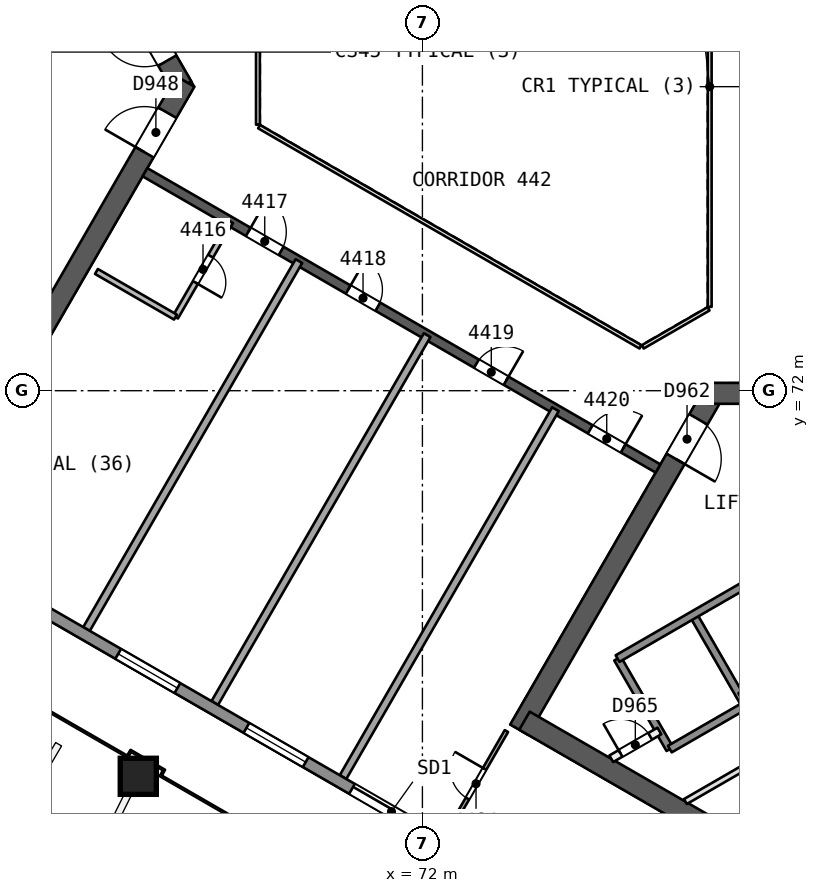
"""IFC4 building model, lengths in metres.
Left out: names, types, materials, properties, quantities, classifications, styles, units other than length and angle.
Written with IfcOpenShell. Run it as: python <this file> out.ifc"""

import sys

from ifc_helpers import new_model, si_unit, direction, frame, frame_2d, origin, origin_2d, place, context, subcontext, project, spatial, rectangle, extrude, element, fill, save


model = new_model("IFC4")
c1 = context("Model", 3, precision=1e-05, world=origin(), true_north=direction((0.0, 1.0)))
c2 = subcontext(c1, "Body", "Model", "MODEL_VIEW")
j1 = project(units=[si_unit("LENGTHUNIT", "METRE"), si_unit("PLANEANGLEUNIT", "RADIAN")], contexts=[c1])
p1 = place(None, origin())
s1 = spatial("IfcSite", under=j1, at=p1, CompositionType="ELEMENT")
p2 = place(p1, origin())
s2 = spatial("IfcBuilding", under=s1, at=p2, CompositionType="ELEMENT")
p3 = place(p2, frame((0.0, 0.0, 182.2)))
s3 = spatial("IfcBuildingStorey", under=s2, at=p3, CompositionType="ELEMENT", Elevation=182.2)
p4 = place(p3, frame((65.682, 80.0, 0.0), z_axis=(0.0, 0.0, 1.0), x_axis=(-0.500000202252, 0.866025287014, 0.0)))
e1 = element("IfcWall", 1, at=p4, inside=s3, PredefinedType="SHEAR", context=c2, shape_type="SweptSolid", body=[
    extrude(rectangle(XDim=10.221, YDim=0.55, at=frame_2d((5.111, 0.0))), origin(), (0.0, 0.0, 1.0), 3.7),
])
p5 = place(p4, frame((0.791, 0.0, 0.0)))
e2 = element("IfcOpeningElement", 2, at=p5, cuts=e1, PredefinedType="OPENING", context=c2, shape_type="SweptSolid", body=[
    extrude(rectangle(XDim=1.2, YDim=2.1, at=frame_2d((0.6, 1.05))), frame((0.0, 0.286, 0.0), z_axis=(0.0, -1.0, 0.0), x_axis=(1.0, 0.0, 0.0)), (0.0, 0.0, 1.0), 0.571),
])
p6 = place(p3, frame((60.709, 71.386, 0.0), z_axis=(0.0, 0.0, 1.0), x_axis=(0.500015938302, 0.866016201606, 0.0)))
e3 = element("IfcWall", 3, at=p6, inside=s3, PredefinedType="SHEAR", context=c2, shape_type="SweptSolid", body=[
    extrude(rectangle(XDim=10.105, YDim=0.55, at=frame_2d((5.053, 0.0))), origin(), (0.0, 0.0, 1.0), 3.7),
])
p7 = place(p6, frame((7.955, 0.0, 0.0)))
e4 = element("IfcOpeningElement", 4, at=p7, cuts=e3, PredefinedType="OPENING", context=c2, shape_type="SweptSolid", body=[
    extrude(rectangle(XDim=1.2, YDim=2.1, at=frame_2d((0.6, 1.05))), frame((0.0, 0.286, 0.0), z_axis=(0.0, -1.0, 0.0), x_axis=(1.0, 0.0, 0.0)), (0.0, 0.0, 1.0), 0.571),
])
p8 = place(p3, frame((79.659, 71.931, 0.0), z_axis=(0.0, 0.0, 1.0), x_axis=(-0.500000202252, -0.866025287014, 0.0)))
e5 = element("IfcWall", 5, at=p8, inside=s3, PredefinedType="SHEAR", context=c2, shape_type="SweptSolid", body=[
    extrude(rectangle(XDim=10.221, YDim=0.55, at=frame_2d((5.111, 0.0))), origin(), (0.0, 0.0, 1.0), 3.7),
])
p9 = place(p8, frame((0.791, 0.0, 0.0)))
e6 = element("IfcOpeningElement", 6, at=p9, cuts=e5, PredefinedType="OPENING", context=c2, shape_type="SweptSolid", body=[
    extrude(rectangle(XDim=1.2, YDim=2.1, at=frame_2d((0.6, 1.05))), frame((0.0, 0.286, 0.0), z_axis=(0.0, -1.0, 0.0), x_axis=(1.0, 0.0, 0.0)), (0.0, 0.0, 1.0), 0.571),
])
p10 = place(p3, frame((74.686, 63.317, 0.0), z_axis=(0.0, 0.0, 1.0), x_axis=(0.866024505738, -0.500001555459, 0.0)))
e7 = element("IfcWall", 7, at=p10, inside=s3, PredefinedType="SHEAR", context=c2, shape_type="SweptSolid", body=[
    extrude(rectangle(XDim=14.059, YDim=0.55, at=frame_2d((7.029, 0.0))), origin(), (0.0, 0.0, 1.0), 3.7),
])
p11 = place(p3, frame((89.605, 71.931, 0.0), z_axis=(0.0, 0.0, 1.0), x_axis=(-1.0, 0.0, 0.0)))
e8 = element("IfcWall", 8, at=p11, inside=s3, PredefinedType="SHEAR", context=c2, shape_type="SweptSolid", body=[
    extrude(rectangle(XDim=10.105, YDim=0.55, at=frame_2d((5.052, 0.0))), origin(), (0.0, 0.0, 1.0), 3.7),
])
p12 = place(p11, frame((7.955, 0.0, 0.0)))
e9 = element("IfcOpeningElement", 9, at=p12, cuts=e8, PredefinedType="OPENING", context=c2, shape_type="SweptSolid", body=[
    extrude(rectangle(XDim=1.2, YDim=2.1, at=frame_2d((0.6, 1.05))), frame((0.0, 0.286, 0.0), z_axis=(0.0, -1.0, 0.0), x_axis=(1.0, 0.0, 0.0)), (0.0, 0.0, 1.0), 0.571),
])
p13 = place(p3, frame((64.7, 77.748, 0.0), z_axis=(0.0, 0.0, 1.0), x_axis=(0.866026492143, -0.499998114903, 0.0)))
e10 = element("IfcWall", 10, at=p13, inside=s3, PredefinedType="SHEAR", context=c2, shape_type="SweptSolid", body=[
    extrude(rectangle(XDim=15.588, YDim=0.25, at=frame_2d((7.794, 0.0))), origin(), (0.0, 0.0, 1.0), 3.25),
])
p14 = place(p13, frame((3.138, 0.0, 0.0)))
e11 = element("IfcOpeningElement", 11, at=p14, cuts=e10, PredefinedType="OPENING", context=c2, shape_type="SweptSolid", body=[
    extrude(rectangle(XDim=1.0, YDim=2.1, at=frame_2d((0.5, 1.05))), frame((0.0, 0.135, 0.0), z_axis=(0.0, -1.0, 0.0), x_axis=(1.0, 0.0, 0.0)), (0.0, 0.0, 1.0), 0.271),
])
p15 = place(p13, frame((6.175, 0.0, 0.0)))
e12 = element("IfcOpeningElement", 12, at=p15, cuts=e10, PredefinedType="OPENING", context=c2, shape_type="SweptSolid", body=[
    extrude(rectangle(XDim=0.9, YDim=2.1, at=frame_2d((0.45, 1.05))), frame((0.0, 0.135, 0.0), z_axis=(0.0, -1.0, 0.0), x_axis=(1.0, 0.0, 0.0)), (0.0, 0.0, 1.0), 0.271),
])
p16 = place(p13, frame((10.072, 0.0, 0.0)))
e13 = element("IfcOpeningElement", 13, at=p16, cuts=e10, PredefinedType="OPENING", context=c2, shape_type="SweptSolid", body=[
    extrude(rectangle(XDim=0.9, YDim=2.1, at=frame_2d((0.45, 1.05))), frame((0.0, 0.135, 0.0), z_axis=(0.0, -1.0, 0.0), x_axis=(1.0, 0.0, 0.0)), (0.0, 0.0, 1.0), 0.271),
])
p17 = place(p13, frame((13.53, 0.0, 0.0)))
e14 = element("IfcOpeningElement", 14, at=p17, cuts=e10, PredefinedType="OPENING", context=c2, shape_type="SweptSolid", body=[
    extrude(rectangle(XDim=1.0, YDim=2.1, at=frame_2d((0.5, 1.05))), frame((0.0, 0.135, 0.0), z_axis=(0.0, -1.0, 0.0), x_axis=(1.0, 0.0, 0.0)), (0.0, 0.0, 1.0), 0.271),
])
p18 = place(p3, frame((64.511, 61.833, 0.0), z_axis=(0.010093620709, 0.017482414954, 0.999796221231), x_axis=(-0.499907122366, -0.865843723195, 0.020187025824)))
e15 = element("IfcColumn", 15, at=p18, inside=s3, PredefinedType="COLUMN", context=c2, shape_type="SweptSolid", body=[
    extrude(rectangle(XDim=0.95, YDim=0.95, at=origin_2d()), origin(), (0.0, 0.0, 1.0), 3.701),
])
p19 = place(p3, frame((66.952, 76.448, 0.0), z_axis=(0.0, 0.0, 1.0), x_axis=(-0.499987231761, -0.866032775405, 0.0)))
e16 = element("IfcWall", 16, at=p19, inside=s3, PredefinedType="PARTITIONING", context=c2, shape_type="SweptSolid", body=[
    extrude(rectangle(XDim=2.9, YDim=0.15, at=frame_2d((1.45, 0.0))), origin(), (0.0, 0.0, 1.0), 3.25),
])
p20 = place(p19, frame((1.05, 0.0, 0.0)))
e17 = element("IfcOpeningElement", 17, at=p20, cuts=e16, PredefinedType="OPENING", context=c2, shape_type="SweptSolid", body=[
    extrude(rectangle(XDim=0.8, YDim=2.1, at=frame_2d((0.4, 1.05))), frame((0.0, 0.085, 0.0), z_axis=(0.0, -1.0, 0.0), x_axis=(1.0, 0.0, 0.0)), (0.0, 0.0, 1.0), 0.171),
])
p21 = place(p3, frame((65.502, 73.937, 0.0), z_axis=(0.0, 0.0, 1.0), x_axis=(-0.865994240961, 0.500053971709, 0.0)))
e18 = element("IfcWall", 18, at=p21, inside=s3, PredefinedType="PARTITIONING", context=c2, shape_type="SweptSolid", body=[
    extrude(rectangle(XDim=2.401, YDim=0.15, at=frame_2d((1.201, 0.0))), origin(), (0.0, 0.0, 1.0), 3.25),
])
for number, where, z_axis, x_axis in (
    (19, (63.161, 65.729, 0.0), (0.0, 0.0, 1.0), (0.5, 0.866, 0.0)),
    (20, (66.536, 63.781, 0.0), (0.0, 0.0, 1.0), (0.5, 0.866, 0.0)),
    (21, (69.911, 61.832, 0.0), (0.0, 0.0, 1.0), (0.5, 0.866, 0.0)),
):
    element("IfcWall", number, at=place(p3, frame(where, z_axis=z_axis, x_axis=x_axis)), inside=s3, PredefinedType="PARTITIONING", context=c2, shape_type="SweptSolid", body=[
        extrude(rectangle(XDim=11.178, YDim=0.2, at=frame_2d((5.589, 0.0))), origin(), (0.0, 0.0, 1.0), 3.25),
    ])
p22 = place(p3, frame((72.611, 60.273, 0.0), z_axis=(0.0, 0.0, 1.0), x_axis=(0.499980071345, 0.866036909293, 0.0)))
e22 = element("IfcWall", 22, at=p22, inside=s3, PredefinedType="PARTITIONING", context=c2, shape_type="SweptSolid", body=[
    extrude(rectangle(XDim=3.199, YDim=0.1, at=frame_2d((1.6, 0.0))), origin(), (0.0, 0.0, 1.0), 3.25),
])
p23 = place(p22, frame((1.15, 0.0, 0.0)))
e23 = element("IfcOpeningElement", 23, at=p23, cuts=e22, PredefinedType="OPENING", context=c2, shape_type="SweptSolid", body=[
    extrude(rectangle(XDim=0.9, YDim=2.1, at=frame_2d((0.45, 1.05))), frame((0.0, 0.061, 0.0), z_axis=(0.0, -1.0, 0.0), x_axis=(1.0, 0.0, 0.0)), (0.0, 0.0, 1.0), 0.121),
])
p24 = place(p3, frame((88.732, 50.794, 0.0), z_axis=(0.0, 0.0, 1.0), x_axis=(-0.866024774967, 0.500001089142, 0.0)))
e24 = element("IfcWall", 24, at=p24, inside=s3, PredefinedType="SOLIDWALL", context=c2, shape_type="SweptSolid", body=[
    extrude(rectangle(XDim=52.991, YDim=0.3, at=frame_2d((26.496, 0.0))), origin(), (0.0, 0.0, 1.0), 3.25),
])
p25 = place(p24, frame((19.06, 0.0, 0.0)))
e25 = element("IfcOpeningElement", 25, at=p25, cuts=e24, PredefinedType="OPENING", context=c2, shape_type="SweptSolid", body=[
    extrude(rectangle(XDim=2.4, YDim=2.4, at=frame_2d((1.2, 1.2))), frame((0.0, 0.161, 0.0), z_axis=(0.0, -1.0, 0.0), x_axis=(1.0, 0.0, 0.0)), (0.0, 0.0, 1.0), 0.321),
])
p26 = place(p24, frame((9.392, 0.0, 0.0)))
e26 = element("IfcOpeningElement", 26, at=p26, cuts=e24, PredefinedType="OPENING", context=c2, shape_type="SweptSolid", body=[
    extrude(rectangle(XDim=2.4, YDim=2.4, at=frame_2d((1.2, 1.2))), frame((0.0, 0.161, 0.0), z_axis=(0.0, -1.0, 0.0), x_axis=(1.0, 0.0, 0.0)), (0.0, 0.0, 1.0), 0.321),
])
p27 = place(p24, frame((40.145, 0.0, 0.0)))
e27 = element("IfcOpeningElement", 27, at=p27, cuts=e24, PredefinedType="OPENING", context=c2, shape_type="SweptSolid", body=[
    extrude(rectangle(XDim=2.4, YDim=2.4, at=frame_2d((1.2, 1.2))), frame((0.0, 0.161, 0.0), z_axis=(0.0, -1.0, 0.0), x_axis=(1.0, 0.0, 0.0)), (0.0, 0.0, 1.0), 0.321),
])
p28 = place(p24, frame((26.765, 0.0, 0.9)))
e28 = element("IfcOpeningElement", 28, at=p28, cuts=e24, PredefinedType="OPENING", context=c2, shape_type="SweptSolid", body=[
    extrude(rectangle(XDim=1.8, YDim=1.5, at=frame_2d((0.9, 0.75))), frame((0.0, 0.161, 0.0), z_axis=(0.0, -1.0, 0.0), x_axis=(1.0, 0.0, 0.0)), (0.0, 0.0, 1.0), 0.321),
])
p29 = place(p24, frame((22.867, 0.0, 0.9)))
e29 = element("IfcOpeningElement", 29, at=p29, cuts=e24, PredefinedType="OPENING", context=c2, shape_type="SweptSolid", body=[
    extrude(rectangle(XDim=1.8, YDim=1.5, at=frame_2d((0.9, 0.75))), frame((0.0, 0.161, 0.0), z_axis=(0.0, -1.0, 0.0), x_axis=(1.0, 0.0, 0.0)), (0.0, 0.0, 1.0), 0.321),
])
for number, where, z_axis, x_axis in (
    (30, (77.135, 64.952, 0.0), (0.0, 0.0, 1.0), (0.5, -0.866, 0.0)),
    (31, (79.127, 66.102, 0.0), (0.0, 0.0, 1.0), (0.5, -0.866, 0.0)),
):
    element("IfcWall", number, at=place(p3, frame(where, z_axis=z_axis, x_axis=x_axis)), inside=s3, PredefinedType="SOLIDWALL", context=c2, shape_type="SweptSolid", body=[
        extrude(rectangle(XDim=2.75, YDim=0.2, at=frame_2d((1.375, 0.0))), origin(), (0.0, 0.0, 1.0), 3.25),
    ])
p30 = place(p3, frame((77.135, 64.952, 0.0), z_axis=(0.0, 0.0, 1.0), x_axis=(0.866031916153, 0.499988720078, 0.0)))
e32 = element("IfcWall", 32, at=p30, inside=s3, PredefinedType="SOLIDWALL", context=c2, shape_type="SweptSolid", body=[
    extrude(rectangle(XDim=11.35, YDim=0.2, at=frame_2d((5.675, 0.0))), origin(), (0.0, 0.0, 1.0), 3.25),
])
p31 = place(p3, frame((76.97, 62.316, 0.0), z_axis=(0.0, 0.0, 1.0), x_axis=(0.865982457891, 0.500074377092, 0.0)))
e33 = element("IfcWall", 33, at=p31, inside=s3, PredefinedType="PARTITIONING", context=c2, shape_type="SweptSolid", body=[
    extrude(rectangle(XDim=1.461, YDim=0.2, at=frame_2d((0.73, 0.0))), origin(), (0.0, 0.0, 1.0), 3.25),
])
p32 = place(p31, frame((0.281, 0.0, 0.0)))
e34 = element("IfcOpeningElement", 34, at=p32, cuts=e33, PredefinedType="OPENING", context=c2, shape_type="SweptSolid", body=[
    extrude(rectangle(XDim=0.9, YDim=2.1, at=frame_2d((0.45, 1.05))), frame((0.0, 0.11, 0.0), z_axis=(0.0, -1.0, 0.0), x_axis=(1.0, 0.0, 0.0)), (0.0, 0.0, 1.0), 0.221),
])
p33 = place(p3, frame((80.367, 63.954, 0.0), z_axis=(0.0, 0.0, 1.0), x_axis=(0.866026575979, 0.499997969693, 0.0)))
e35 = element("IfcWall", 35, at=p33, inside=s3, PredefinedType="SOLIDWALL", context=c2, shape_type="SweptSolid", body=[
    extrude(rectangle(XDim=6.75, YDim=0.2, at=frame_2d((3.375, 0.0))), origin(), (0.0, 0.0, 1.0), 3.25),
])
p34 = place(p3, frame((78.51, 62.57, 0.0), z_axis=(0.0, 0.0, 1.0), x_axis=(0.866053019151, 0.499952165731, 0.0)))
e36 = element("IfcWall", 36, at=p34, inside=s3, PredefinedType="SOLIDWALL", context=c2, shape_type="SweptSolid", body=[
    extrude(rectangle(XDim=2.3, YDim=0.2, at=frame_2d((1.15, 0.0))), origin(), (0.0, 0.0, 1.0), 3.25),
])
p35 = place(p3, frame((78.92, 61.19, 0.0), z_axis=(0.0, 0.0, 1.0), x_axis=(0.866038211682, 0.499977815414, 0.0)))
e37 = element("IfcWall", 37, at=p35, inside=s3, PredefinedType="PARTITIONING", context=c2, shape_type="SweptSolid", body=[
    extrude(rectangle(XDim=2.51, YDim=0.15, at=frame_2d((1.255, 0.0))), origin(), (0.0, 0.0, 1.0), 3.25),
])
p36 = place(p3, frame((79.56, 74.206, 0.0), z_axis=(0.0, 0.0, 1.0), x_axis=(0.0, 1.0, 0.0)))
e38 = element("IfcWall", 38, at=p36, inside=s3, PredefinedType="PARTITIONING", context=c2, shape_type="SweptSolid", body=[
    extrude(rectangle(XDim=11.588, YDim=0.1, at=frame_2d((5.794, 0.0))), origin(), (0.0, 0.0, 1.0), 3.25),
])
p37 = place(p3, frame((67.672, 81.0, 0.0), z_axis=(0.0, 0.0, 1.0), x_axis=(0.0, -1.0, 0.0)))
e39 = element("IfcWall", 39, at=p37, inside=s3, PredefinedType="PARTITIONING", context=c2, shape_type="SweptSolid", body=[
    extrude(rectangle(XDim=2.0, YDim=0.1, at=frame_2d((1.0, 0.0))), origin(), (0.0, 0.0, 1.0), 3.25),
])
p38 = place(p3, frame((67.702, 78.948, 0.0), z_axis=(0.0, 0.0, 1.0), x_axis=(0.866026658274, -0.499997827154, 0.0)))
e40 = element("IfcWall", 40, at=p38, inside=s3, PredefinedType="PARTITIONING", context=c2, shape_type="SweptSolid", body=[
    extrude(rectangle(XDim=11.588, YDim=0.1, at=frame_2d((5.794, 0.0))), origin(), (0.0, 0.0, 1.0), 3.25),
])
p39 = place(p3, frame((77.798, 73.154, 0.0), z_axis=(0.0, 0.0, 1.0), x_axis=(0.866041268327, 0.499972520799, 0.0)))
e41 = element("IfcWall", 41, at=p39, inside=s3, PredefinedType="PARTITIONING", context=c2, shape_type="SweptSolid", body=[
    extrude(rectangle(XDim=2.0, YDim=0.1, at=frame_2d((1.0, 0.0))), origin(), (0.0, 0.0, 1.0), 3.25),
])
p40 = place(p20, origin())
e42 = element("IfcDoor", 42, at=p40, inside=s3, OperationType="SINGLE_SWING_RIGHT", PredefinedType="NOTDEFINED", context=c2, shape_type="SweptSolid", body=[
    extrude(rectangle(XDim=0.8, YDim=2.1, at=frame_2d((0.4, 1.05))), frame((0.0, 0.025, 0.0), z_axis=(0.0, -1.0, 0.0), x_axis=(1.0, 0.0, 0.0)), (0.0, 0.0, 1.0), 0.05),
])
fill(e17, e42)
p41 = place(p14, origin())
e43 = element("IfcDoor", 43, at=p41, inside=s3, OperationType="SINGLE_SWING_LEFT", PredefinedType="NOTDEFINED", context=c2, shape_type="SweptSolid", body=[
    extrude(rectangle(XDim=1.0, YDim=2.1, at=frame_2d((0.5, 1.05))), frame((0.0, 0.025, 0.0), z_axis=(0.0, -1.0, 0.0), x_axis=(1.0, 0.0, 0.0)), (0.0, 0.0, 1.0), 0.05),
])
fill(e11, e43)
p42 = place(p15, origin())
e44 = element("IfcDoor", 44, at=p42, inside=s3, OperationType="SINGLE_SWING_LEFT", PredefinedType="NOTDEFINED", context=c2, shape_type="SweptSolid", body=[
    extrude(rectangle(XDim=0.9, YDim=2.1, at=frame_2d((0.45, 1.05))), frame((0.0, 0.025, 0.0), z_axis=(0.0, -1.0, 0.0), x_axis=(1.0, 0.0, 0.0)), (0.0, 0.0, 1.0), 0.05),
])
fill(e12, e44)
p43 = place(p16, origin())
e45 = element("IfcDoor", 45, at=p43, inside=s3, OperationType="SINGLE_SWING_RIGHT", PredefinedType="NOTDEFINED", context=c2, shape_type="SweptSolid", body=[
    extrude(rectangle(XDim=0.9, YDim=2.1, at=frame_2d((0.45, 1.05))), frame((0.0, 0.025, 0.0), z_axis=(0.0, -1.0, 0.0), x_axis=(1.0, 0.0, 0.0)), (0.0, 0.0, 1.0), 0.05),
])
fill(e13, e45)
p44 = place(p17, origin())
e46 = element("IfcDoor", 46, at=p44, inside=s3, OperationType="SINGLE_SWING_RIGHT", PredefinedType="NOTDEFINED", context=c2, shape_type="SweptSolid", body=[
    extrude(rectangle(XDim=1.0, YDim=2.1, at=frame_2d((0.5, 1.05))), frame((0.0, 0.025, 0.0), z_axis=(0.0, -1.0, 0.0), x_axis=(1.0, 0.0, 0.0)), (0.0, 0.0, 1.0), 0.05),
])
fill(e14, e46)
p45 = place(p23, origin())
e47 = element("IfcDoor", 47, at=p45, inside=s3, OperationType="SINGLE_SWING_RIGHT", PredefinedType="NOTDEFINED", context=c2, shape_type="SweptSolid", body=[
    extrude(rectangle(XDim=0.9, YDim=2.1, at=frame_2d((0.45, 1.05))), frame((0.0, 0.025, 0.0), z_axis=(0.0, -1.0, 0.0), x_axis=(1.0, 0.0, 0.0)), (0.0, 0.0, 1.0), 0.05),
])
fill(e23, e47)
p46 = place(p25, origin())
e48 = element("IfcDoor", 48, at=p46, inside=s3, OperationType="SLIDING_TO_LEFT", PredefinedType="NOTDEFINED", context=c2, shape_type="SweptSolid", body=[
    extrude(rectangle(XDim=2.4, YDim=2.4, at=frame_2d((1.2, 1.2))), frame((0.0, 0.025, 0.0), z_axis=(0.0, -1.0, 0.0), x_axis=(1.0, 0.0, 0.0)), (0.0, 0.0, 1.0), 0.05),
])
fill(e25, e48)
p47 = place(p28, origin())
e49 = element("IfcWindow", 49, at=p47, inside=s3, PartitioningType="SINGLE_PANEL", PredefinedType="WINDOW", context=c2, shape_type="SweptSolid", body=[
    extrude(rectangle(XDim=1.8, YDim=1.5, at=frame_2d((0.9, 0.75))), frame((0.0, 0.03, 0.0), z_axis=(0.0, -1.0, 0.0), x_axis=(1.0, 0.0, 0.0)), (0.0, 0.0, 1.0), 0.06),
])
fill(e28, e49)
p48 = place(p29, origin())
e50 = element("IfcWindow", 50, at=p48, inside=s3, PartitioningType="SINGLE_PANEL", PredefinedType="WINDOW", context=c2, shape_type="SweptSolid", body=[
    extrude(rectangle(XDim=1.8, YDim=1.5, at=frame_2d((0.9, 0.75))), frame((0.0, 0.03, 0.0), z_axis=(0.0, -1.0, 0.0), x_axis=(1.0, 0.0, 0.0)), (0.0, 0.0, 1.0), 0.06),
])
fill(e29, e50)
p49 = place(p5, origin())
e51 = element("IfcDoor", 51, at=p49, inside=s3, OperationType="SINGLE_SWING_RIGHT", PredefinedType="NOTDEFINED", context=c2, shape_type="SweptSolid", body=[
    extrude(rectangle(XDim=1.2, YDim=2.1, at=frame_2d((0.6, 1.05))), frame((0.0, 0.025, 0.0), z_axis=(0.0, -1.0, 0.0), x_axis=(1.0, 0.0, 0.0)), (0.0, 0.0, 1.0), 0.05),
])
fill(e2, e51)
p50 = place(p7, origin())
e52 = element("IfcDoor", 52, at=p50, inside=s3, OperationType="SINGLE_SWING_LEFT", PredefinedType="NOTDEFINED", context=c2, shape_type="SweptSolid", body=[
    extrude(rectangle(XDim=1.2, YDim=2.1, at=frame_2d((0.6, 1.05))), frame((0.0, 0.025, 0.0), z_axis=(0.0, -1.0, 0.0), x_axis=(1.0, 0.0, 0.0)), (0.0, 0.0, 1.0), 0.05),
])
fill(e4, e52)
p51 = place(p9, origin())
e53 = element("IfcDoor", 53, at=p51, inside=s3, OperationType="SINGLE_SWING_RIGHT", PredefinedType="NOTDEFINED", context=c2, shape_type="SweptSolid", body=[
    extrude(rectangle(XDim=1.2, YDim=2.1, at=frame_2d((0.6, 1.05))), frame((0.0, 0.025, 0.0), z_axis=(0.0, -1.0, 0.0), x_axis=(1.0, 0.0, 0.0)), (0.0, 0.0, 1.0), 0.05),
])
fill(e6, e53)
p52 = place(p32, origin())
e54 = element("IfcDoor", 54, at=p52, inside=s3, OperationType="SINGLE_SWING_LEFT", PredefinedType="NOTDEFINED", context=c2, shape_type="SweptSolid", body=[
    extrude(rectangle(XDim=0.9, YDim=2.1, at=frame_2d((0.45, 1.05))), frame((0.0, 0.025, 0.0), z_axis=(0.0, -1.0, 0.0), x_axis=(1.0, 0.0, 0.0)), (0.0, 0.0, 1.0), 0.05),
])
fill(e34, e54)
save(model, sys.argv[1])
